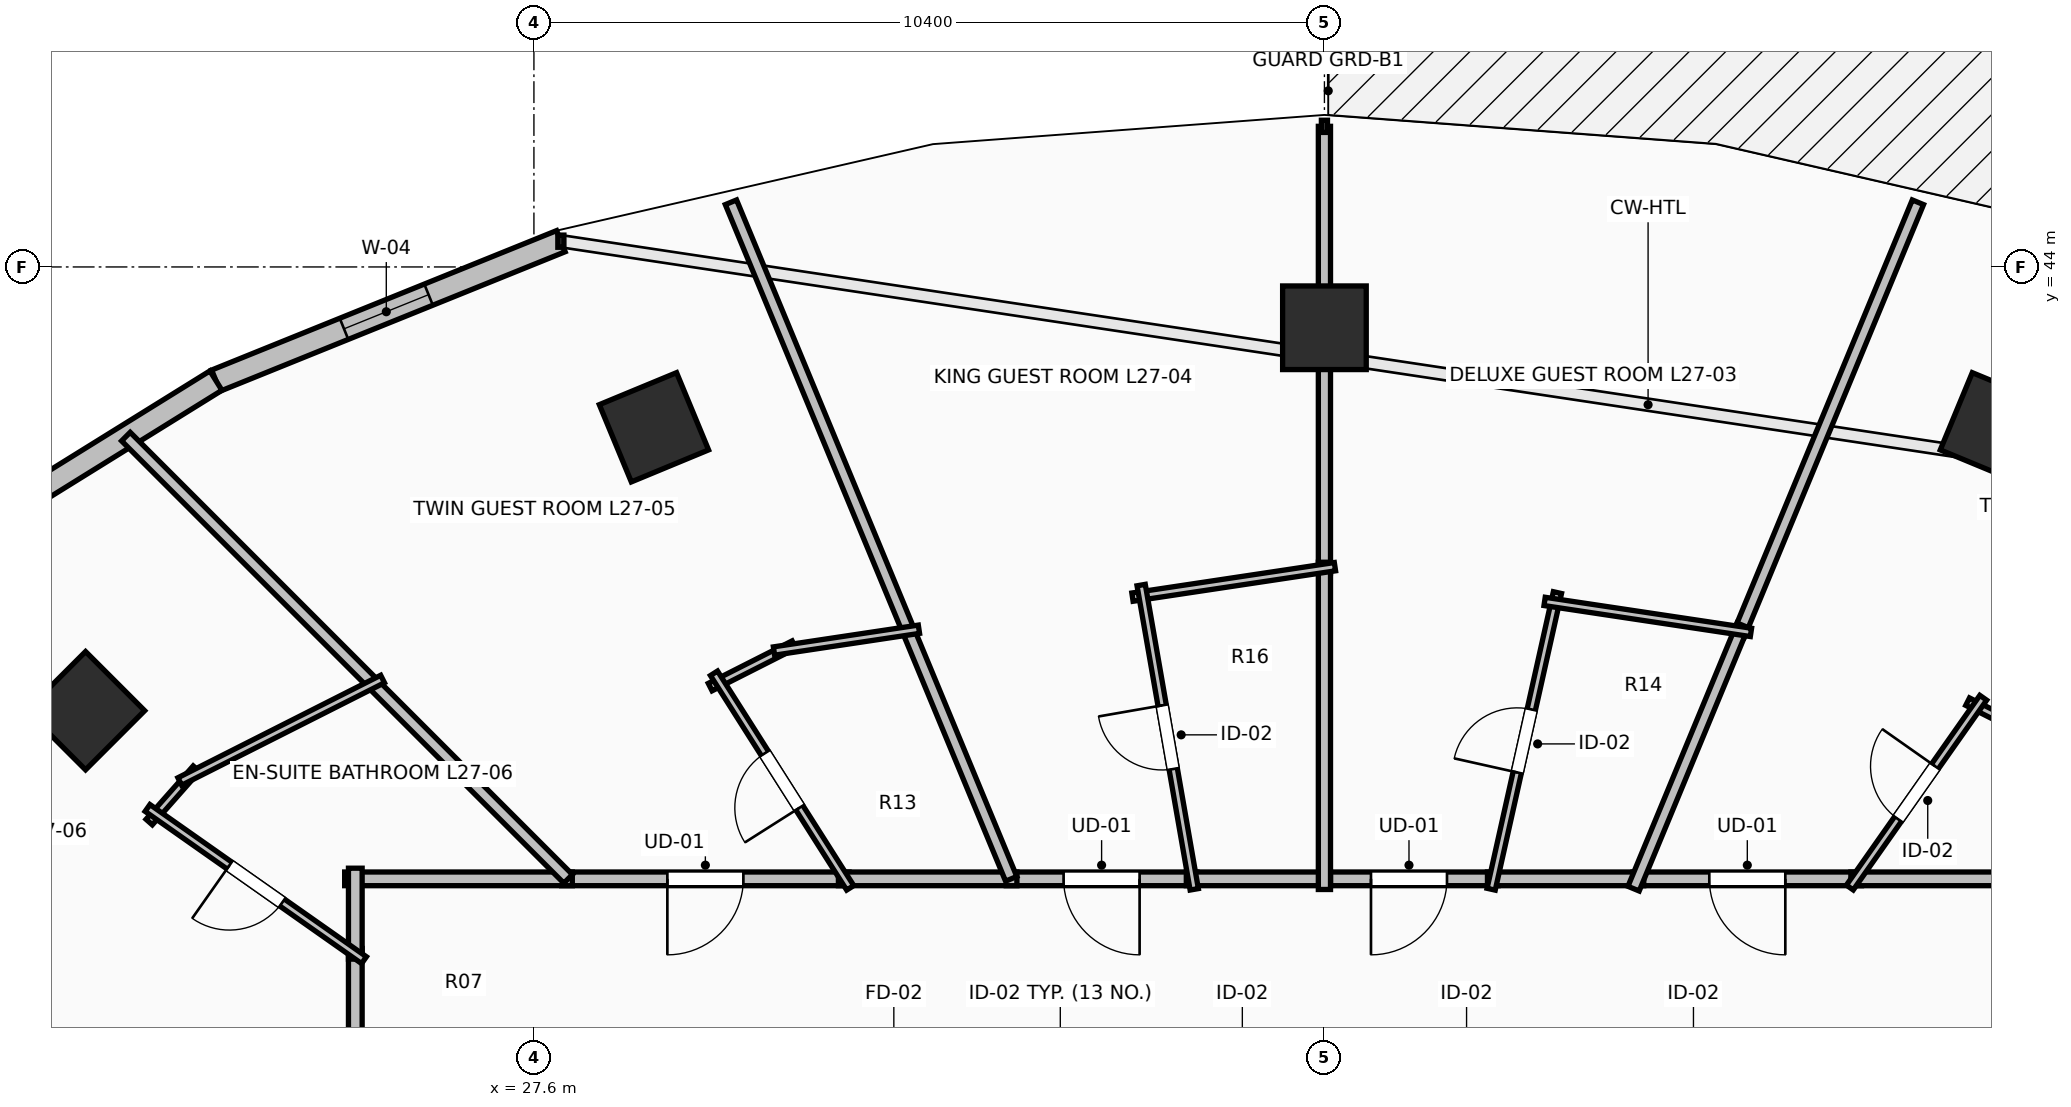
"""IFC4 building model, lengths in metres.
Left out: names, types, materials, properties, quantities, classifications, styles, units other than length and angle.
Written with IfcOpenShell. Run it as: python <this file> out.ifc"""

import sys

from ifc_helpers import new_model, si_unit, direction, frame, frame_2d, origin, origin_2d, place, context, subcontext, project, spatial, rectangle, extrude, element, fill, save


model = new_model("IFC4")
c1 = context("Model", 3, precision=1e-05, world=origin(), true_north=direction((0.0, 1.0)))
c2 = subcontext(c1, "Body", "Model", "MODEL_VIEW")
j1 = project(units=[si_unit("LENGTHUNIT", "METRE"), si_unit("PLANEANGLEUNIT", "RADIAN")], contexts=[c1])
p1 = place(None, origin())
s1 = spatial("IfcSite", under=j1, at=p1, CompositionType="ELEMENT")
p2 = place(p1, origin())
s2 = spatial("IfcBuilding", under=s1, at=p2, CompositionType="ELEMENT")
p3 = place(p2, frame((0.0, 0.0, 103.3)))
s3 = spatial("IfcBuildingStorey", under=s2, at=p3, CompositionType="ELEMENT", Elevation=103.3)
for number, where, z_axis, x_axis in (
    (1, (46.821, 41.891, 0.0), (0.0, 0.0, 1.0), (0.383, 0.924, 0.0)),
    (2, (38.0, 43.2, 0.0), (0.0, 0.0, 1.0), (0.0, 1.0, 0.0)),
    (3, (29.179, 41.891, 0.0), (0.0, 0.0, 1.0), (-0.383, 0.924, 0.0)),
    (4, (21.701, 38.162, 0.0), (0.0, 0.0, 1.0), (-0.707, 0.707, 0.0)),
):
    element("IfcColumn", number, at=place(p3, frame(where, z_axis=z_axis, x_axis=x_axis)), inside=s3, PredefinedType="COLUMN", context=c2, shape_type="SweptSolid", body=[
        extrude(rectangle(XDim=1.1, YDim=1.1, at=origin_2d()), origin(), (0.0, 0.0, 1.0), 3.5),
    ])
p4 = place(p3, frame((27.955, 44.339, 0.0), z_axis=(0.0, 0.0, 1.0), x_axis=(-0.927122233109, -0.374759075775, 0.0)))
e5 = element("IfcWall", 5, at=p4, inside=s3, PredefinedType="STANDARD", context=c2, shape_type="SweptSolid", body=[
    extrude(rectangle(XDim=4.895, YDim=0.3, at=frame_2d((2.448, 0.0))), origin(), (0.0, 0.0, 1.0), 3.24),
])
p5 = place(p4, frame((1.877, 0.0, 0.85)))
e6 = element("IfcOpeningElement", 6, at=p5, cuts=e5, PredefinedType="OPENING", context=c2, shape_type="SweptSolid", body=[
    extrude(rectangle(XDim=1.2, YDim=1.95, at=frame_2d((0.6, 0.975))), frame((0.0, 0.165, 0.0), z_axis=(0.0, -1.0, 0.0), x_axis=(1.0, 0.0, 0.0)), (0.0, 0.0, 1.0), 0.33),
])
p6 = place(p3, frame((23.416, 42.505, 0.0), z_axis=(0.0, 0.0, 1.0), x_axis=(-0.849684479743, -0.527291461038, 0.0)))
e7 = element("IfcWall", 7, at=p6, inside=s3, PredefinedType="STANDARD", context=c2, shape_type="SweptSolid", body=[
    extrude(rectangle(XDim=4.681, YDim=0.3, at=frame_2d((2.341, 0.0))), origin(), (0.0, 0.0, 1.0), 3.24),
])
p7 = place(p3, frame((45.066, 35.95, 0.0), z_axis=(0.0, 0.0, 1.0), x_axis=(-1.0, 0.0, 0.0)))
e8 = element("IfcWall", 8, at=p7, inside=s3, PredefinedType="PARTITIONING", context=c2, shape_type="SweptSolid", body=[
    extrude(rectangle(XDim=3.005, YDim=0.18, at=frame_2d((1.502, 0.0))), origin(), (0.0, 0.0, 1.0), 3.24),
])
p8 = place(p7, frame((1.002, 0.0, 0.0)))
e9 = element("IfcOpeningElement", 9, at=p8, cuts=e8, PredefinedType="OPENING", context=c2, shape_type="SweptSolid", body=[
    extrude(rectangle(XDim=1.0, YDim=2.15, at=frame_2d((0.5, 1.075))), frame((0.0, 0.105, 0.0), z_axis=(0.0, -1.0, 0.0), x_axis=(1.0, 0.0, 0.0)), (0.0, 0.0, 1.0), 0.21),
])
p9 = place(p3, frame((48.03, 35.95, 0.0), z_axis=(0.0, 0.0, 1.0), x_axis=(-1.0, 0.0, 0.0)))
e10 = element("IfcWall", 10, at=p9, inside=s3, PredefinedType="PARTITIONING", context=c2, shape_type="SweptSolid", body=[
    extrude(rectangle(XDim=3.104, YDim=0.18, at=frame_2d((1.552, 0.0))), origin(), (0.0, 0.0, 1.0), 2.432),
])
p10 = place(p3, frame((40.285, 35.95, 0.0), z_axis=(0.0, 0.0, 1.0), x_axis=(-1.0, 0.0, 0.0)))
e11 = element("IfcWall", 11, at=p10, inside=s3, PredefinedType="PARTITIONING", context=c2, shape_type="SweptSolid", body=[
    extrude(rectangle(XDim=2.345, YDim=0.18, at=frame_2d((1.172, 0.0))), origin(), (0.0, 0.0, 1.0), 3.24),
])
p11 = place(p10, frame((0.673, 0.0, 0.0)))
e12 = element("IfcOpeningElement", 12, at=p11, cuts=e11, PredefinedType="OPENING", context=c2, shape_type="SweptSolid", body=[
    extrude(rectangle(XDim=1.0, YDim=2.15, at=frame_2d((0.5, 1.075))), frame((0.0, 0.105, 0.0), z_axis=(0.0, -1.0, 0.0), x_axis=(1.0, 0.0, 0.0)), (0.0, 0.0, 1.0), 0.21),
])
p12 = place(p3, frame((42.201, 35.95, 0.0), z_axis=(0.0, 0.0, 1.0), x_axis=(-1.0, 0.0, 0.0)))
e13 = element("IfcWall", 13, at=p12, inside=s3, PredefinedType="PARTITIONING", context=c2, shape_type="SweptSolid", body=[
    extrude(rectangle(XDim=2.056, YDim=0.18, at=frame_2d((1.028, 0.0))), origin(), (0.0, 0.0, 1.0), 3.24),
])
p13 = place(p3, frame((36.323, 35.95, 0.0), z_axis=(0.0, 0.0, 1.0), x_axis=(-1.0, 0.0, 0.0)))
e14 = element("IfcWall", 14, at=p13, inside=s3, PredefinedType="PARTITIONING", context=c2, shape_type="SweptSolid", body=[
    extrude(rectangle(XDim=2.509, YDim=0.18, at=frame_2d((1.254, 0.0))), origin(), (0.0, 0.0, 1.0), 3.24),
])
p14 = place(p13, frame((0.754, 0.0, 0.0)))
e15 = element("IfcOpeningElement", 15, at=p14, cuts=e14, PredefinedType="OPENING", context=c2, shape_type="SweptSolid", body=[
    extrude(rectangle(XDim=1.0, YDim=2.15, at=frame_2d((0.5, 1.075))), frame((0.0, 0.105, 0.0), z_axis=(0.0, -1.0, 0.0), x_axis=(1.0, 0.0, 0.0)), (0.0, 0.0, 1.0), 0.21),
])
p15 = place(p3, frame((38.08, 35.95, 0.0), z_axis=(0.0, 0.0, 1.0), x_axis=(-1.0, 0.0, 0.0)))
e16 = element("IfcWall", 16, at=p15, inside=s3, PredefinedType="PARTITIONING", context=c2, shape_type="SweptSolid", body=[
    extrude(rectangle(XDim=1.897, YDim=0.18, at=frame_2d((0.948, 0.0))), origin(), (0.0, 0.0, 1.0), 3.24),
])
p16 = place(p3, frame((31.746, 35.95, 0.0), z_axis=(0.0, 0.0, 1.0), x_axis=(-1.0, 0.0, 0.0)))
e17 = element("IfcWall", 17, at=p16, inside=s3, PredefinedType="PARTITIONING", context=c2, shape_type="SweptSolid", body=[
    extrude(rectangle(XDim=3.781, YDim=0.18, at=frame_2d((1.891, 0.0))), origin(), (0.0, 0.0, 1.0), 2.432),
])
p17 = place(p16, frame((1.39, 0.0, 0.0)))
e18 = element("IfcOpeningElement", 18, at=p17, cuts=e17, PredefinedType="OPENING", context=c2, shape_type="SweptSolid", body=[
    extrude(rectangle(XDim=1.0, YDim=2.15, at=frame_2d((0.5, 1.075))), frame((0.0, 0.105, 0.0), z_axis=(0.0, -1.0, 0.0), x_axis=(1.0, 0.0, 0.0)), (0.0, 0.0, 1.0), 0.21),
])
p18 = place(p3, frame((33.954, 35.95, 0.0), z_axis=(0.0, 0.0, 1.0), x_axis=(-1.0, 0.0, 0.0)))
e19 = element("IfcWall", 19, at=p18, inside=s3, PredefinedType="PARTITIONING", context=c2, shape_type="SweptSolid", body=[
    extrude(rectangle(XDim=2.348, YDim=0.18, at=frame_2d((1.174, 0.0))), origin(), (0.0, 0.0, 1.0), 3.24),
])
p19 = place(p3, frame((25.25, 35.034, 0.0), z_axis=(0.0, 0.0, 1.0), x_axis=(0.0, -1.0, 0.0)))
e20 = element("IfcWall", 20, at=p19, inside=s3, PredefinedType="PARTITIONING", context=c2, shape_type="SweptSolid", body=[
    extrude(rectangle(XDim=3.813, YDim=0.18, at=frame_2d((1.906, 0.0))), origin(), (0.0, 0.0, 1.0), 2.432),
])
p20 = place(p19, frame((1.406, 0.0, 0.0)))
e21 = element("IfcOpeningElement", 21, at=p20, cuts=e20, PredefinedType="OPENING", context=c2, shape_type="SweptSolid", body=[
    extrude(rectangle(XDim=1.0, YDim=2.15, at=frame_2d((0.5, 1.075))), frame((0.0, 0.105, 0.0), z_axis=(0.0, -1.0, 0.0), x_axis=(1.0, 0.0, 0.0)), (0.0, 0.0, 1.0), 0.21),
])
p21 = place(p3, frame((28.105, 35.95, 0.0), z_axis=(0.0, 0.0, 1.0), x_axis=(-1.0, 0.0, 0.0)))
e22 = element("IfcWall", 22, at=p21, inside=s3, PredefinedType="PARTITIONING", context=c2, shape_type="SweptSolid", body=[
    extrude(rectangle(XDim=2.995, YDim=0.18, at=frame_2d((1.498, 0.0))), origin(), (0.0, 0.0, 1.0), 2.432),
])
p22 = place(p3, frame((25.25, 36.09, 0.0), z_axis=(0.0, 0.0, 1.0), x_axis=(0.0, -1.0, 0.0)))
e23 = element("IfcWall", 23, at=p22, inside=s3, PredefinedType="PARTITIONING", context=c2, shape_type="SweptSolid", body=[
    extrude(rectangle(XDim=1.196, YDim=0.18, at=frame_2d((0.598, 0.0))), origin(), (0.0, 0.0, 1.0), 2.432),
])
p23 = place(p3, frame((46.462, 38.281, 0.0), z_axis=(0.0, 0.0, 1.0), x_axis=(0.892486842203, -0.451073426944, 0.0)))
e24 = element("IfcWall", 24, at=p23, inside=s3, PredefinedType="PARTITIONING", context=c2, shape_type="SweptSolid", body=[
    extrude(rectangle(XDim=2.982, YDim=0.11, at=frame_2d((1.491, 0.0))), origin(), (0.0, 0.0, 1.0), 2.432),
])
p24 = place(p3, frame((44.913, 35.835, 0.0), z_axis=(0.0, 0.0, 1.0), x_axis=(0.574986040322, 0.818163219312, 0.0)))
e25 = element("IfcWall", 25, at=p24, inside=s3, PredefinedType="PARTITIONING", context=c2, shape_type="SweptSolid", body=[
    extrude(rectangle(XDim=3.052, YDim=0.11, at=frame_2d((1.526, 0.0))), origin(), (0.0, 0.0, 1.0), 2.886),
])
p25 = place(p24, frame((1.101, 0.0, 0.0)))
e26 = element("IfcOpeningElement", 26, at=p25, cuts=e25, PredefinedType="OPENING", context=c2, shape_type="SweptSolid", body=[
    extrude(rectangle(XDim=0.85, YDim=2.1, at=frame_2d((0.425, 1.05))), frame((0.0, 0.07, 0.0), z_axis=(0.0, -1.0, 0.0), x_axis=(1.0, 0.0, 0.0)), (0.0, 0.0, 1.0), 0.14),
])
p26 = place(p3, frame((45.808, 44.851, 0.0), z_axis=(0.0, 0.0, 1.0), x_axis=(-0.382705075352, -0.923870567395, 0.0)))
e27 = element("IfcWall", 27, at=p26, inside=s3, PredefinedType="PARTITIONING", context=c2, shape_type="SweptSolid", body=[
    extrude(rectangle(XDim=6.164, YDim=0.16, at=frame_2d((3.082, 0.0))), origin(), (0.0, 0.0, 1.0), 2.677),
])
p27 = place(p3, frame((43.503, 39.285, 0.0), z_axis=(0.0, 0.0, 1.0), x_axis=(-0.382733183699, -0.923858923265, 0.0)))
e28 = element("IfcWall", 28, at=p27, inside=s3, PredefinedType="PARTITIONING", context=c2, shape_type="SweptSolid", body=[
    extrude(rectangle(XDim=3.75, YDim=0.16, at=frame_2d((1.875, 0.0))), origin(), (0.0, 0.0, 1.0), 2.886),
])
p28 = place(p3, frame((40.194, 35.813, 0.0), z_axis=(0.0, 0.0, 1.0), x_axis=(0.21804880916, 0.975937865248, 0.0)))
e29 = element("IfcWall", 29, at=p28, inside=s3, PredefinedType="PARTITIONING", context=c2, shape_type="SweptSolid", body=[
    extrude(rectangle(XDim=3.998, YDim=0.11, at=frame_2d((1.999, 0.0))), origin(), (0.0, 0.0, 1.0), 2.886),
])
p29 = place(p28, frame((1.574, 0.0, 0.0)))
e30 = element("IfcOpeningElement", 30, at=p29, cuts=e29, PredefinedType="OPENING", context=c2, shape_type="SweptSolid", body=[
    extrude(rectangle(XDim=0.85, YDim=2.1, at=frame_2d((0.425, 1.05))), frame((0.0, 0.07, 0.0), z_axis=(0.0, -1.0, 0.0), x_axis=(1.0, 0.0, 0.0)), (0.0, 0.0, 1.0), 0.14),
])
p30 = place(p3, frame((40.896, 39.6, 0.0), z_axis=(0.0, 0.0, 1.0), x_axis=(0.98891024541, -0.148514398367, 0.0)))
e31 = element("IfcWall", 31, at=p30, inside=s3, PredefinedType="PARTITIONING", context=c2, shape_type="SweptSolid", body=[
    extrude(rectangle(XDim=2.745, YDim=0.11, at=frame_2d((1.373, 0.0))), origin(), (0.0, 0.0, 1.0), 2.972),
])
p31 = place(p3, frame((38.0, 45.85, 0.0), z_axis=(0.0, 0.0, 1.0), x_axis=(0.0, -1.0, 0.0)))
e32 = element("IfcWall", 32, at=p31, inside=s3, PredefinedType="PARTITIONING", context=c2, shape_type="SweptSolid", body=[
    extrude(rectangle(XDim=5.875, YDim=0.16, at=frame_2d((2.938, 0.0))), origin(), (0.0, 0.0, 1.0), 3.24),
])
p32 = place(p3, frame((38.0, 40.115, 0.0), z_axis=(0.0, 0.0, 1.0), x_axis=(0.0, -1.0, 0.0)))
e33 = element("IfcWall", 33, at=p32, inside=s3, PredefinedType="PARTITIONING", context=c2, shape_type="SweptSolid", body=[
    extrude(rectangle(XDim=4.305, YDim=0.16, at=frame_2d((2.152, 0.0))), origin(), (0.0, 0.0, 1.0), 2.886),
])
p33 = place(p3, frame((35.475, 39.656, 0.0), z_axis=(0.0, 0.0, 1.0), x_axis=(0.988878442063, 0.148726012595, 0.0)))
e34 = element("IfcWall", 34, at=p33, inside=s3, PredefinedType="PARTITIONING", context=c2, shape_type="SweptSolid", body=[
    extrude(rectangle(XDim=2.694, YDim=0.11, at=frame_2d((1.347, 0.0))), origin(), (0.0, 0.0, 1.0), 2.972),
])
p34 = place(p3, frame((36.287, 35.812, 0.0), z_axis=(0.0, 0.0, 1.0), x_axis=(-0.171838135253, 0.985125197766, 0.0)))
e35 = element("IfcWall", 35, at=p34, inside=s3, PredefinedType="PARTITIONING", context=c2, shape_type="SweptSolid", body=[
    extrude(rectangle(XDim=4.063, YDim=0.11, at=frame_2d((2.032, 0.0))), origin(), (0.0, 0.0, 1.0), 2.886),
])
p35 = place(p34, frame((1.607, 0.0, 0.0)))
e36 = element("IfcOpeningElement", 36, at=p35, cuts=e35, PredefinedType="OPENING", context=c2, shape_type="SweptSolid", body=[
    extrude(rectangle(XDim=0.85, YDim=2.1, at=frame_2d((0.425, 1.05))), frame((0.0, 0.07, 0.0), z_axis=(0.0, -1.0, 0.0), x_axis=(1.0, 0.0, 0.0)), (0.0, 0.0, 1.0), 0.14),
])
p36 = place(p3, frame((30.192, 44.851, 0.0), z_axis=(0.0, 0.0, 1.0), x_axis=(0.382687492799, -0.923877850614, 0.0)))
e37 = element("IfcWall", 37, at=p36, inside=s3, PredefinedType="PARTITIONING", context=c2, shape_type="SweptSolid", body=[
    extrude(rectangle(XDim=9.635, YDim=0.16, at=frame_2d((4.817, 0.0))), origin(), (0.0, 0.0, 1.0), 2.432),
])
p37 = place(p3, frame((29.919, 38.473, 0.0), z_axis=(0.0, 0.0, 1.0), x_axis=(0.892084606746, 0.45186840386, 0.0)))
e38 = element("IfcWall", 38, at=p37, inside=s3, PredefinedType="PARTITIONING", context=c2, shape_type="SweptSolid", body=[
    extrude(rectangle(XDim=1.236, YDim=0.11, at=frame_2d((0.618, 0.0))), origin(), (0.0, 0.0, 1.0), 3.24),
])
p38 = place(p3, frame((30.759, 38.947, 0.0), z_axis=(0.0, 0.0, 1.0), x_axis=(0.988889867338, 0.148650026153, 0.0)))
e39 = element("IfcWall", 39, at=p38, inside=s3, PredefinedType="PARTITIONING", context=c2, shape_type="SweptSolid", body=[
    extrude(rectangle(XDim=1.928, YDim=0.11, at=frame_2d((0.964, 0.0))), origin(), (0.0, 0.0, 1.0), 3.24),
])
p39 = place(p3, frame((31.761, 35.832, 0.0), z_axis=(0.0, 0.0, 1.0), x_axis=(-0.535991614842, 0.844223305067, 0.0)))
e40 = element("IfcWall", 40, at=p39, inside=s3, PredefinedType="PARTITIONING", context=c2, shape_type="SweptSolid", body=[
    extrude(rectangle(XDim=3.343, YDim=0.11, at=frame_2d((1.672, 0.0))), origin(), (0.0, 0.0, 1.0), 2.432),
])
p40 = place(p39, frame((1.247, 0.0, 0.0)))
e41 = element("IfcOpeningElement", 41, at=p40, cuts=e40, PredefinedType="OPENING", context=c2, shape_type="SweptSolid", body=[
    extrude(rectangle(XDim=0.85, YDim=2.1, at=frame_2d((0.425, 1.05))), frame((0.0, 0.07, 0.0), z_axis=(0.0, -1.0, 0.0), x_axis=(1.0, 0.0, 0.0)), (0.0, 0.0, 1.0), 0.14),
])
p41 = place(p3, frame((22.232, 41.768, 0.0), z_axis=(0.0, 0.0, 1.0), x_axis=(0.707106781187, -0.707106781187, 0.0)))
e42 = element("IfcWall", 42, at=p41, inside=s3, PredefinedType="PARTITIONING", context=c2, shape_type="SweptSolid", body=[
    extrude(rectangle(XDim=8.228, YDim=0.16, at=frame_2d((4.114, 0.0))), origin(), (0.0, 0.0, 1.0), 2.432),
])
p42 = place(p3, frame((22.538, 36.697, 0.0), z_axis=(0.0, 0.0, 1.0), x_axis=(0.662242037053, 0.749289986827, 0.0)))
e43 = element("IfcWall", 43, at=p42, inside=s3, PredefinedType="PARTITIONING", context=c2, shape_type="SweptSolid", body=[
    extrude(rectangle(XDim=0.937, YDim=0.11, at=frame_2d((0.468, 0.0))), origin(), (0.0, 0.0, 1.0), 2.432),
])
p43 = place(p3, frame((22.941, 37.231, 0.0), z_axis=(0.0, 0.0, 1.0), x_axis=(0.892507731149, 0.451032094024, 0.0)))
e44 = element("IfcWall", 44, at=p43, inside=s3, PredefinedType="PARTITIONING", context=c2, shape_type="SweptSolid", body=[
    extrude(rectangle(XDim=2.989, YDim=0.11, at=frame_2d((1.495, 0.0))), origin(), (0.0, 0.0, 1.0), 2.432),
])
p44 = place(p3, frame((25.365, 34.881, 0.0), z_axis=(0.0, 0.0, 1.0), x_axis=(-0.81809360258, 0.575085087111, 0.0)))
e45 = element("IfcWall", 45, at=p44, inside=s3, PredefinedType="PARTITIONING", context=c2, shape_type="SweptSolid", body=[
    extrude(rectangle(XDim=3.481, YDim=0.11, at=frame_2d((1.741, 0.0))), origin(), (0.0, 0.0, 1.0), 2.432),
])
p45 = place(p44, frame((1.316, 0.0, 0.0)))
e46 = element("IfcOpeningElement", 46, at=p45, cuts=e45, PredefinedType="OPENING", context=c2, shape_type="SweptSolid", body=[
    extrude(rectangle(XDim=0.85, YDim=2.1, at=frame_2d((0.425, 1.05))), frame((0.0, 0.07, 0.0), z_axis=(0.0, -1.0, 0.0), x_axis=(1.0, 0.0, 0.0)), (0.0, 0.0, 1.0), 0.14),
])
p46 = place(p3, frame((15.089, 35.49, 0.0), z_axis=(0.0, 0.0, 1.0), x_axis=(0.923888472039, -0.382661849723, 0.0)))
e47 = element("IfcWall", 47, at=p46, inside=s3, PredefinedType="PARTITIONING", context=c2, shape_type="SweptSolid", body=[
    extrude(rectangle(XDim=7.51, YDim=0.16, at=frame_2d((3.755, 0.0))), origin(), (0.0, 0.0, 1.0), 2.677),
])
p47 = place(p5, origin())
e48 = element("IfcWindow", 48, at=p47, inside=s3, PartitioningType="SINGLE_PANEL", PredefinedType="WINDOW", context=c2, shape_type="SweptSolid", body=[
    extrude(rectangle(XDim=1.2, YDim=1.95, at=frame_2d((0.6, 0.975))), frame((0.0, 0.03, 0.0), z_axis=(0.0, -1.0, 0.0), x_axis=(1.0, 0.0, 0.0)), (0.0, 0.0, 1.0), 0.06),
])
fill(e6, e48)
p48 = place(p8, origin())
e49 = element("IfcDoor", 49, at=p48, inside=s3, OperationType="SINGLE_SWING_LEFT", PredefinedType="DOOR", context=c2, shape_type="SweptSolid", body=[
    extrude(rectangle(XDim=1.0, YDim=2.15, at=frame_2d((0.5, 1.075))), frame((0.0, 0.025, 0.0), z_axis=(0.0, -1.0, 0.0), x_axis=(1.0, 0.0, 0.0)), (0.0, 0.0, 1.0), 0.05),
])
fill(e9, e49)
p49 = place(p11, origin())
e50 = element("IfcDoor", 50, at=p49, inside=s3, OperationType="SINGLE_SWING_RIGHT", PredefinedType="DOOR", context=c2, shape_type="SweptSolid", body=[
    extrude(rectangle(XDim=1.0, YDim=2.15, at=frame_2d((0.5, 1.075))), frame((0.0, 0.025, 0.0), z_axis=(0.0, -1.0, 0.0), x_axis=(1.0, 0.0, 0.0)), (0.0, 0.0, 1.0), 0.05),
])
fill(e12, e50)
p50 = place(p14, origin())
e51 = element("IfcDoor", 51, at=p50, inside=s3, OperationType="SINGLE_SWING_LEFT", PredefinedType="DOOR", context=c2, shape_type="SweptSolid", body=[
    extrude(rectangle(XDim=1.0, YDim=2.15, at=frame_2d((0.5, 1.075))), frame((0.0, 0.025, 0.0), z_axis=(0.0, -1.0, 0.0), x_axis=(1.0, 0.0, 0.0)), (0.0, 0.0, 1.0), 0.05),
])
fill(e15, e51)
p51 = place(p17, origin())
e52 = element("IfcDoor", 52, at=p51, inside=s3, OperationType="SINGLE_SWING_RIGHT", PredefinedType="DOOR", context=c2, shape_type="SweptSolid", body=[
    extrude(rectangle(XDim=1.0, YDim=2.15, at=frame_2d((0.5, 1.075))), frame((0.0, 0.025, 0.0), z_axis=(0.0, -1.0, 0.0), x_axis=(1.0, 0.0, 0.0)), (0.0, 0.0, 1.0), 0.05),
])
fill(e18, e52)
p52 = place(p25, origin())
e53 = element("IfcDoor", 53, at=p52, inside=s3, OperationType="SINGLE_SWING_RIGHT", PredefinedType="DOOR", context=c2, shape_type="SweptSolid", body=[
    extrude(rectangle(XDim=0.85, YDim=2.1, at=frame_2d((0.425, 1.05))), frame((0.0, 0.025, 0.0), z_axis=(0.0, -1.0, 0.0), x_axis=(1.0, 0.0, 0.0)), (0.0, 0.0, 1.0), 0.05),
])
fill(e26, e53)
p53 = place(p29, origin())
e54 = element("IfcDoor", 54, at=p53, inside=s3, OperationType="SINGLE_SWING_LEFT", PredefinedType="DOOR", context=c2, shape_type="SweptSolid", body=[
    extrude(rectangle(XDim=0.85, YDim=2.1, at=frame_2d((0.425, 1.05))), frame((0.0, 0.025, 0.0), z_axis=(0.0, -1.0, 0.0), x_axis=(1.0, 0.0, 0.0)), (0.0, 0.0, 1.0), 0.05),
])
fill(e30, e54)
p54 = place(p35, origin())
e55 = element("IfcDoor", 55, at=p54, inside=s3, OperationType="SINGLE_SWING_RIGHT", PredefinedType="DOOR", context=c2, shape_type="SweptSolid", body=[
    extrude(rectangle(XDim=0.85, YDim=2.1, at=frame_2d((0.425, 1.05))), frame((0.0, 0.025, 0.0), z_axis=(0.0, -1.0, 0.0), x_axis=(1.0, 0.0, 0.0)), (0.0, 0.0, 1.0), 0.05),
])
fill(e36, e55)
p55 = place(p40, origin())
e56 = element("IfcDoor", 56, at=p55, inside=s3, OperationType="SINGLE_SWING_LEFT", PredefinedType="DOOR", context=c2, shape_type="SweptSolid", body=[
    extrude(rectangle(XDim=0.85, YDim=2.1, at=frame_2d((0.425, 1.05))), frame((0.0, 0.025, 0.0), z_axis=(0.0, -1.0, 0.0), x_axis=(1.0, 0.0, 0.0)), (0.0, 0.0, 1.0), 0.05),
])
fill(e41, e56)
p56 = place(p45, origin())
e57 = element("IfcDoor", 57, at=p56, inside=s3, OperationType="SINGLE_SWING_RIGHT", PredefinedType="DOOR", context=c2, shape_type="SweptSolid", body=[
    extrude(rectangle(XDim=0.85, YDim=2.1, at=frame_2d((0.425, 1.05))), frame((0.0, 0.025, 0.0), z_axis=(0.0, -1.0, 0.0), x_axis=(1.0, 0.0, 0.0)), (0.0, 0.0, 1.0), 0.05),
])
fill(e46, e57)
save(model, sys.argv[1])
